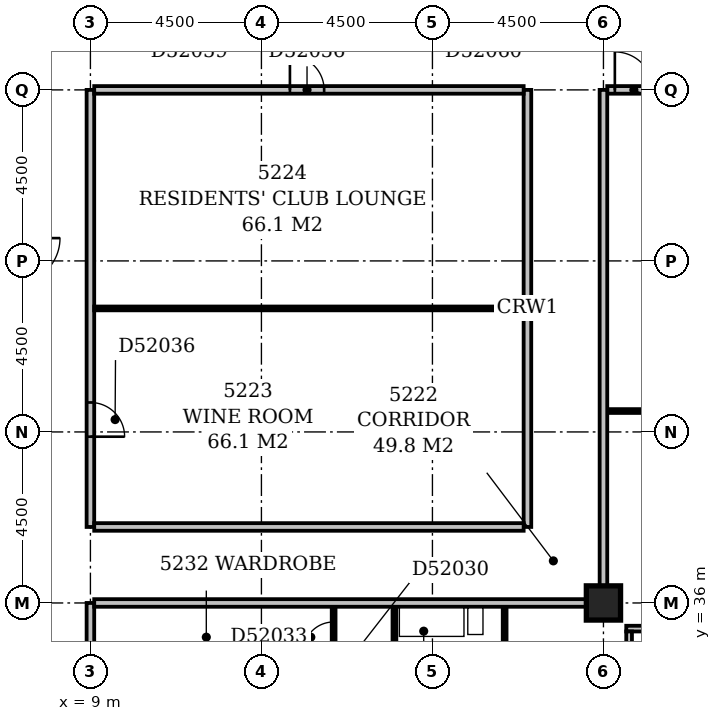
"""IFC4 building model, lengths in metres.
Left out: names, types, materials, properties, quantities, classifications, styles, units other than length and angle.
Written with IfcOpenShell. Run it as: python <this file> out.ifc"""

import sys

from ifc_helpers import new_model, si_unit, direction, frame, frame_2d, origin, origin_2d, place, context, subcontext, project, spatial, rectangle, extrude, element, fill, save


model = new_model("IFC4")
c1 = context("Model", 3, precision=1e-05, world=origin(), true_north=direction((0.0, 1.0)))
c2 = subcontext(c1, "Body", "Model", "MODEL_VIEW")
j1 = project(units=[si_unit("LENGTHUNIT", "METRE"), si_unit("PLANEANGLEUNIT", "RADIAN")], contexts=[c1])
p1 = place(None, origin())
s1 = spatial("IfcSite", under=j1, at=p1, CompositionType="ELEMENT")
p2 = place(p1, origin())
s2 = spatial("IfcBuilding", under=s1, at=p2, CompositionType="ELEMENT")
p3 = place(p2, frame((0.0, 0.0, 204.2)))
s3 = spatial("IfcBuildingStorey", under=s2, at=p3, CompositionType="ELEMENT", Elevation=204.2)
p4 = place(p3, frame((22.5, 36.0, -0.3), z_axis=(0.0, 0.0, 1.0), x_axis=(1.0, 0.0, 0.0)))
e1 = element("IfcColumn", 1, at=p4, inside=s3, PredefinedType="COLUMN", context=c2, shape_type="SweptSolid", body=[
    extrude(rectangle(XDim=0.9, YDim=0.9, at=origin_2d()), origin(), (0.0, 0.0, 1.0), 3.6),
])
p5 = place(p3, frame((23.175, 17.4, 0.0), z_axis=(0.0, 0.0, 1.0), x_axis=(0.0, 1.0, 0.0)))
e2 = element("IfcWall", 2, at=p5, inside=s3, PredefinedType="STANDARD", context=c2, shape_type="SweptSolid", body=[
    extrude(rectangle(XDim=17.85, YDim=0.15, at=frame_2d((8.925, 0.0))), origin(), (0.0, 0.0, 1.0), 2.7),
])
p6 = place(p5, frame((1.65, 0.0, 0.6)))
e3 = element("IfcOpeningElement", 3, at=p6, cuts=e2, PredefinedType="OPENING", context=c2, shape_type="SweptSolid", body=[
    extrude(rectangle(XDim=2.4, YDim=1.8, at=frame_2d((1.2, 0.9))), frame((0.0, 0.087, 0.0), z_axis=(0.0, -1.0, 0.0), x_axis=(1.0, 0.0, 0.0)), (0.0, 0.0, 1.0), 0.174),
])
p7 = place(p5, frame((6.15, 0.0, 0.6)))
e4 = element("IfcOpeningElement", 4, at=p7, cuts=e2, PredefinedType="OPENING", context=c2, shape_type="SweptSolid", body=[
    extrude(rectangle(XDim=2.4, YDim=1.8, at=frame_2d((1.2, 0.9))), frame((0.0, 0.087, 0.0), z_axis=(0.0, -1.0, 0.0), x_axis=(1.0, 0.0, 0.0)), (0.0, 0.0, 1.0), 0.174),
])
p8 = place(p5, frame((10.65, 0.0, 0.6)))
e5 = element("IfcOpeningElement", 5, at=p8, cuts=e2, PredefinedType="OPENING", context=c2, shape_type="SweptSolid", body=[
    extrude(rectangle(XDim=2.4, YDim=1.8, at=frame_2d((1.2, 0.9))), frame((0.0, 0.087, 0.0), z_axis=(0.0, -1.0, 0.0), x_axis=(1.0, 0.0, 0.0)), (0.0, 0.0, 1.0), 0.174),
])
p9 = place(p5, frame((15.15, 0.0, 0.6)))
e6 = element("IfcOpeningElement", 6, at=p9, cuts=e2, PredefinedType="OPENING", context=c2, shape_type="SweptSolid", body=[
    extrude(rectangle(XDim=2.4, YDim=1.8, at=frame_2d((1.2, 0.9))), frame((0.0, 0.087, 0.0), z_axis=(0.0, -1.0, 0.0), x_axis=(1.0, 0.0, 0.0)), (0.0, 0.0, 1.0), 0.174),
])
p10 = place(p3, frame((23.1, 35.325, 0.0), z_axis=(0.0, 0.0, 1.0), x_axis=(1.0, 0.0, 0.0)))
e7 = element("IfcWall", 7, at=p10, inside=s3, PredefinedType="STANDARD", context=c2, shape_type="SweptSolid", body=[
    extrude(rectangle(XDim=27.15, YDim=0.15, at=frame_2d((13.575, 0.0))), origin(), (0.0, 0.0, 1.0), 2.7),
])
p11 = place(p10, frame((0.45, 0.0, 0.6)))
e8 = element("IfcOpeningElement", 8, at=p11, cuts=e7, PredefinedType="OPENING", context=c2, shape_type="SweptSolid", body=[
    extrude(rectangle(XDim=2.4, YDim=1.8, at=frame_2d((1.2, 0.9))), frame((0.0, 0.087, 0.0), z_axis=(0.0, -1.0, 0.0), x_axis=(1.0, 0.0, 0.0)), (0.0, 0.0, 1.0), 0.174),
])
p12 = place(p10, frame((4.95, 0.0, 0.6)))
e9 = element("IfcOpeningElement", 9, at=p12, cuts=e7, PredefinedType="OPENING", context=c2, shape_type="SweptSolid", body=[
    extrude(rectangle(XDim=2.4, YDim=1.8, at=frame_2d((1.2, 0.9))), frame((0.0, 0.087, 0.0), z_axis=(0.0, -1.0, 0.0), x_axis=(1.0, 0.0, 0.0)), (0.0, 0.0, 1.0), 0.174),
])
p13 = place(p10, frame((9.118, 0.0, 0.6)))
e10 = element("IfcOpeningElement", 10, at=p13, cuts=e7, PredefinedType="OPENING", context=c2, shape_type="SweptSolid", body=[
    extrude(rectangle(XDim=0.45, YDim=1.8, at=frame_2d((0.225, 0.9))), frame((0.0, 0.087, 0.0), z_axis=(0.0, -1.0, 0.0), x_axis=(1.0, 0.0, 0.0)), (0.0, 0.0, 1.0), 0.174),
])
p14 = place(p10, frame((11.218, 0.0, 0.6)))
e11 = element("IfcOpeningElement", 11, at=p14, cuts=e7, PredefinedType="OPENING", context=c2, shape_type="SweptSolid", body=[
    extrude(rectangle(XDim=0.9, YDim=1.8, at=frame_2d((0.45, 0.9))), frame((0.0, 0.087, 0.0), z_axis=(0.0, -1.0, 0.0), x_axis=(1.0, 0.0, 0.0)), (0.0, 0.0, 1.0), 0.174),
])
p15 = place(p10, frame((13.61, 0.0, 0.6)))
e12 = element("IfcOpeningElement", 12, at=p15, cuts=e7, PredefinedType="OPENING", context=c2, shape_type="SweptSolid", body=[
    extrude(rectangle(XDim=1.2, YDim=1.8, at=frame_2d((0.6, 0.9))), frame((0.0, 0.087, 0.0), z_axis=(0.0, -1.0, 0.0), x_axis=(1.0, 0.0, 0.0)), (0.0, 0.0, 1.0), 0.174),
])
p16 = place(p10, frame((18.45, 0.0, 0.6)))
e13 = element("IfcOpeningElement", 13, at=p16, cuts=e7, PredefinedType="OPENING", context=c2, shape_type="SweptSolid", body=[
    extrude(rectangle(XDim=2.4, YDim=1.8, at=frame_2d((1.2, 0.9))), frame((0.0, 0.087, 0.0), z_axis=(0.0, -1.0, 0.0), x_axis=(1.0, 0.0, 0.0)), (0.0, 0.0, 1.0), 0.174),
])
p17 = place(p10, frame((22.95, 0.0, 0.6)))
e14 = element("IfcOpeningElement", 14, at=p17, cuts=e7, PredefinedType="OPENING", context=c2, shape_type="SweptSolid", body=[
    extrude(rectangle(XDim=2.4, YDim=1.8, at=frame_2d((1.2, 0.9))), frame((0.0, 0.087, 0.0), z_axis=(0.0, -1.0, 0.0), x_axis=(1.0, 0.0, 0.0)), (0.0, 0.0, 1.0), 0.174),
])
p18 = place(p3, frame((9.0, 5.0, 0.0), z_axis=(0.0, 0.0, 1.0), x_axis=(0.0, 1.0, 0.0)))
e15 = element("IfcWall", 15, at=p18, inside=s3, PredefinedType="PARTITIONING", context=c2, shape_type="SweptSolid", body=[
    extrude(rectangle(XDim=31.0, YDim=0.2, at=frame_2d((15.5, 0.0))), origin(), (0.0, 0.0, 1.0), 3.3),
])
p19 = place(p18, frame((18.4, 0.0, 0.0)))
e16 = element("IfcOpeningElement", 16, at=p19, cuts=e15, PredefinedType="OPENING", context=c2, shape_type="SweptSolid", body=[
    extrude(rectangle(XDim=1.0, YDim=2.1, at=frame_2d((0.5, 1.05))), frame((0.0, 0.112, 0.0), z_axis=(0.0, -1.0, 0.0), x_axis=(1.0, 0.0, 0.0)), (0.0, 0.0, 1.0), 0.224),
])
p20 = place(p18, frame((11.7, 0.0, 0.0)))
e17 = element("IfcOpeningElement", 17, at=p20, cuts=e15, PredefinedType="OPENING", context=c2, shape_type="SweptSolid", body=[
    extrude(rectangle(XDim=1.0, YDim=2.1, at=frame_2d((0.5, 1.05))), frame((0.0, 0.112, 0.0), z_axis=(0.0, -1.0, 0.0), x_axis=(1.0, 0.0, 0.0)), (0.0, 0.0, 1.0), 0.224),
])
p21 = place(p18, frame((1.5, 0.0, 0.0)))
e18 = element("IfcOpeningElement", 18, at=p21, cuts=e15, PredefinedType="OPENING", context=c2, shape_type="SweptSolid", body=[
    extrude(rectangle(XDim=0.9, YDim=2.1, at=frame_2d((0.45, 1.05))), frame((0.0, 0.112, 0.0), z_axis=(0.0, -1.0, 0.0), x_axis=(1.0, 0.0, 0.0)), (0.0, 0.0, 1.0), 0.224),
])
p22 = place(p3, frame((17.0, 18.1, 0.0), z_axis=(0.0, 0.0, 1.0), x_axis=(0.0, 1.0, 0.0)))
e19 = element("IfcWall", 19, at=p22, inside=s3, PredefinedType="PARTITIONING", context=c2, shape_type="SweptSolid", body=[
    extrude(rectangle(XDim=17.8, YDim=0.1, at=frame_2d((8.9, 0.0))), origin(), (0.0, 0.0, 1.0), 3.3),
])
p23 = place(p22, frame((2.85, 0.0, 0.0)))
e20 = element("IfcOpeningElement", 20, at=p23, cuts=e19, PredefinedType="OPENING", context=c2, shape_type="SweptSolid", body=[
    extrude(rectangle(XDim=0.9, YDim=2.1, at=frame_2d((0.45, 1.05))), frame((0.0, 0.062, 0.0), z_axis=(0.0, -1.0, 0.0), x_axis=(1.0, 0.0, 0.0)), (0.0, 0.0, 1.0), 0.124),
])
p24 = place(p22, frame((8.4, 0.0, 0.0)))
e21 = element("IfcOpeningElement", 21, at=p24, cuts=e19, PredefinedType="OPENING", context=c2, shape_type="SweptSolid", body=[
    extrude(rectangle(XDim=0.9, YDim=2.1, at=frame_2d((0.45, 1.05))), frame((0.0, 0.062, 0.0), z_axis=(0.0, -1.0, 0.0), x_axis=(1.0, 0.0, 0.0)), (0.0, 0.0, 1.0), 0.124),
])
p25 = place(p22, frame((14.05, 0.0, 0.0)))
e22 = element("IfcOpeningElement", 22, at=p25, cuts=e19, PredefinedType="OPENING", context=c2, shape_type="SweptSolid", body=[
    extrude(rectangle(XDim=0.9, YDim=2.1, at=frame_2d((0.45, 1.05))), frame((0.0, 0.062, 0.0), z_axis=(0.0, -1.0, 0.0), x_axis=(1.0, 0.0, 0.0)), (0.0, 0.0, 1.0), 0.124),
])
p26 = place(p3, frame((15.4, 24.7, 0.0), z_axis=(0.0, 0.0, 1.0), x_axis=(0.0, 1.0, 0.0)))
e23 = element("IfcWall", 23, at=p26, inside=s3, PredefinedType="PARTITIONING", context=c2, shape_type="SweptSolid", body=[
    extrude(rectangle(XDim=11.2, YDim=0.1, at=frame_2d((5.6, 0.0))), origin(), (0.0, 0.0, 1.0), 3.3),
])
p27 = place(p26, frame((0.8, 0.0, 0.0)))
e24 = element("IfcOpeningElement", 24, at=p27, cuts=e23, PredefinedType="OPENING", context=c2, shape_type="SweptSolid", body=[
    extrude(rectangle(XDim=0.8, YDim=2.1, at=frame_2d((0.4, 1.05))), frame((0.0, 0.062, 0.0), z_axis=(0.0, -1.0, 0.0), x_axis=(1.0, 0.0, 0.0)), (0.0, 0.0, 1.0), 0.124),
])
p28 = place(p26, frame((8.1, 0.0, 0.0)))
e25 = element("IfcOpeningElement", 25, at=p28, cuts=e23, PredefinedType="OPENING", context=c2, shape_type="SweptSolid", body=[
    extrude(rectangle(XDim=0.8, YDim=2.1, at=frame_2d((0.4, 1.05))), frame((0.0, 0.062, 0.0), z_axis=(0.0, -1.0, 0.0), x_axis=(1.0, 0.0, 0.0)), (0.0, 0.0, 1.0), 0.124),
])
p29 = place(p26, frame((4.3, 0.0, 0.0)))
e26 = element("IfcOpeningElement", 26, at=p29, cuts=e23, PredefinedType="OPENING", context=c2, shape_type="SweptSolid", body=[
    extrude(rectangle(XDim=0.8, YDim=2.1, at=frame_2d((0.4, 1.05))), frame((0.0, 0.062, 0.0), z_axis=(0.0, -1.0, 0.0), x_axis=(1.0, 0.0, 0.0)), (0.0, 0.0, 1.0), 0.124),
])
p30 = place(p26, frame((6.1, 0.0, 0.0)))
e27 = element("IfcOpeningElement", 27, at=p30, cuts=e23, PredefinedType="OPENING", context=c2, shape_type="SweptSolid", body=[
    extrude(rectangle(XDim=0.8, YDim=2.1, at=frame_2d((0.4, 1.05))), frame((0.0, 0.062, 0.0), z_axis=(0.0, -1.0, 0.0), x_axis=(1.0, 0.0, 0.0)), (0.0, 0.0, 1.0), 0.124),
])
p31 = place(p26, frame((10.0, 0.0, 0.0)))
e28 = element("IfcOpeningElement", 28, at=p31, cuts=e23, PredefinedType="OPENING", context=c2, shape_type="SweptSolid", body=[
    extrude(rectangle(XDim=0.8, YDim=2.1, at=frame_2d((0.4, 1.05))), frame((0.0, 0.062, 0.0), z_axis=(0.0, -1.0, 0.0), x_axis=(1.0, 0.0, 0.0)), (0.0, 0.0, 1.0), 0.124),
])
p32 = place(p26, frame((2.75, 0.0, 0.0)))
e29 = element("IfcOpeningElement", 29, at=p32, cuts=e23, PredefinedType="OPENING", context=c2, shape_type="SweptSolid", body=[
    extrude(rectangle(XDim=0.8, YDim=2.1, at=frame_2d((0.4, 1.05))), frame((0.0, 0.062, 0.0), z_axis=(0.0, -1.0, 0.0), x_axis=(1.0, 0.0, 0.0)), (0.0, 0.0, 1.0), 0.124),
])
p33 = place(p3, frame((19.9, 33.7, 0.0), z_axis=(0.0, 0.0, 1.0), x_axis=(0.0, 1.0, 0.0)))
e30 = element("IfcWall", 30, at=p33, inside=s3, PredefinedType="PLUMBINGWALL", context=c2, shape_type="SweptSolid", body=[
    extrude(rectangle(XDim=2.2, YDim=0.1, at=frame_2d((1.1, 0.0))), origin(), (0.0, 0.0, 1.0), 3.3),
])
p34 = place(p3, frame((9.1, 36.0, 0.0), z_axis=(0.0, 0.0, 1.0), x_axis=(1.0, 0.0, 0.0)))
e31 = element("IfcWall", 31, at=p34, inside=s3, PredefinedType="PARTITIONING", context=c2, shape_type="SweptSolid", body=[
    extrude(rectangle(XDim=12.95, YDim=0.2, at=frame_2d((6.475, 0.0))), origin(), (0.0, 0.0, 1.0), 3.3),
])
p35 = place(p3, frame((22.5, 36.45, 0.0), z_axis=(0.0, 0.0, 1.0), x_axis=(0.0, 1.0, 0.0)))
e32 = element("IfcWall", 32, at=p35, inside=s3, PredefinedType="PARTITIONING", context=c2, shape_type="SweptSolid", body=[
    extrude(rectangle(XDim=13.05, YDim=0.2, at=frame_2d((6.525, 0.0))), origin(), (0.0, 0.0, 1.0), 3.3),
])
p36 = place(p3, frame((9.0, 38.0, 0.0), z_axis=(0.0, 0.0, 1.0), x_axis=(0.0, 1.0, 0.0)))
e33 = element("IfcWall", 33, at=p36, inside=s3, PredefinedType="PARTITIONING", context=c2, shape_type="SweptSolid", body=[
    extrude(rectangle(XDim=11.5, YDim=0.2, at=frame_2d((5.75, 0.0))), origin(), (0.0, 0.0, 1.0), 3.3),
])
p37 = place(p36, frame((2.375, 0.0, 0.0)))
e34 = element("IfcOpeningElement", 34, at=p37, cuts=e33, PredefinedType="OPENING", context=c2, shape_type="SweptSolid", body=[
    extrude(rectangle(XDim=0.9, YDim=2.1, at=frame_2d((0.45, 1.05))), frame((0.0, 0.112, 0.0), z_axis=(0.0, -1.0, 0.0), x_axis=(1.0, 0.0, 0.0)), (0.0, 0.0, 1.0), 0.224),
])
p38 = place(p3, frame((9.1, 38.0, 0.0), z_axis=(0.0, 0.0, 1.0), x_axis=(1.0, 0.0, 0.0)))
e35 = element("IfcWall", 35, at=p38, inside=s3, PredefinedType="PARTITIONING", context=c2, shape_type="SweptSolid", body=[
    extrude(rectangle(XDim=11.3, YDim=0.2, at=frame_2d((5.65, 0.0))), origin(), (0.0, 0.0, 1.0), 3.3),
])
p39 = place(p3, frame((20.5, 38.0, 0.0), z_axis=(0.0, 0.0, 1.0), x_axis=(0.0, 1.0, 0.0)))
e36 = element("IfcWall", 36, at=p39, inside=s3, PredefinedType="PARTITIONING", context=c2, shape_type="SweptSolid", body=[
    extrude(rectangle(XDim=11.5, YDim=0.2, at=frame_2d((5.75, 0.0))), origin(), (0.0, 0.0, 1.0), 3.3),
])
p40 = place(p3, frame((22.6, 41.05, 0.0), z_axis=(0.0, 0.0, 1.0), x_axis=(1.0, 0.0, 0.0)))
e37 = element("IfcWall", 37, at=p40, inside=s3, PredefinedType="PARTITIONING", context=c2, shape_type="SweptSolid", body=[
    extrude(rectangle(XDim=22.3, YDim=0.1, at=frame_2d((11.15, 0.0))), origin(), (0.0, 0.0, 1.0), 3.3),
])
p41 = place(p40, frame((3.9, 0.0, 0.0)))
e38 = element("IfcOpeningElement", 38, at=p41, cuts=e37, PredefinedType="OPENING", context=c2, shape_type="SweptSolid", body=[
    extrude(rectangle(XDim=0.9, YDim=2.1, at=frame_2d((0.45, 1.05))), frame((0.0, 0.062, 0.0), z_axis=(0.0, -1.0, 0.0), x_axis=(1.0, 0.0, 0.0)), (0.0, 0.0, 1.0), 0.124),
])
p42 = place(p40, frame((9.55, 0.0, 0.0)))
e39 = element("IfcOpeningElement", 39, at=p42, cuts=e37, PredefinedType="OPENING", context=c2, shape_type="SweptSolid", body=[
    extrude(rectangle(XDim=0.9, YDim=2.1, at=frame_2d((0.45, 1.05))), frame((0.0, 0.062, 0.0), z_axis=(0.0, -1.0, 0.0), x_axis=(1.0, 0.0, 0.0)), (0.0, 0.0, 1.0), 0.124),
])
p43 = place(p40, frame((16.35, 0.0, 0.0)))
e40 = element("IfcOpeningElement", 40, at=p43, cuts=e37, PredefinedType="OPENING", context=c2, shape_type="SweptSolid", body=[
    extrude(rectangle(XDim=0.9, YDim=2.1, at=frame_2d((0.45, 1.05))), frame((0.0, 0.062, 0.0), z_axis=(0.0, -1.0, 0.0), x_axis=(1.0, 0.0, 0.0)), (0.0, 0.0, 1.0), 0.124),
])
p44 = place(p40, frame((19.7, 0.0, 0.0)))
e41 = element("IfcOpeningElement", 41, at=p44, cuts=e37, PredefinedType="OPENING", context=c2, shape_type="SweptSolid", body=[
    extrude(rectangle(XDim=0.9, YDim=2.1, at=frame_2d((0.45, 1.05))), frame((0.0, 0.062, 0.0), z_axis=(0.0, -1.0, 0.0), x_axis=(1.0, 0.0, 0.0)), (0.0, 0.0, 1.0), 0.124),
])
p45 = place(p3, frame((9.1, 43.75, 0.0), z_axis=(0.0, 0.0, 1.0), x_axis=(1.0, 0.0, 0.0)))
e42 = element("IfcWall", 42, at=p45, inside=s3, PredefinedType="PARTITIONING", context=c2, shape_type="SweptSolid", body=[
    extrude(rectangle(XDim=11.3, YDim=0.1, at=frame_2d((5.65, 0.0))), origin(), (0.0, 0.0, 1.0), 3.3),
])
p46 = place(p3, frame((9.1, 49.5, 0.0), z_axis=(0.0, 0.0, 1.0), x_axis=(1.0, 0.0, 0.0)))
e43 = element("IfcWall", 43, at=p46, inside=s3, PredefinedType="PARTITIONING", context=c2, shape_type="SweptSolid", body=[
    extrude(rectangle(XDim=11.3, YDim=0.2, at=frame_2d((5.65, 0.0))), origin(), (0.0, 0.0, 1.0), 3.3),
])
p47 = place(p46, frame((5.15, 0.0, 0.0)))
e44 = element("IfcOpeningElement", 44, at=p47, cuts=e43, PredefinedType="OPENING", context=c2, shape_type="SweptSolid", body=[
    extrude(rectangle(XDim=0.9, YDim=2.1, at=frame_2d((0.45, 1.05))), frame((0.0, 0.112, 0.0), z_axis=(0.0, -1.0, 0.0), x_axis=(1.0, 0.0, 0.0)), (0.0, 0.0, 1.0), 0.224),
])
p48 = place(p3, frame((22.6, 49.5, 0.0), z_axis=(0.0, 0.0, 1.0), x_axis=(1.0, 0.0, 0.0)))
e45 = element("IfcWall", 45, at=p48, inside=s3, PredefinedType="PARTITIONING", context=c2, shape_type="SweptSolid", body=[
    extrude(rectangle(XDim=30.95, YDim=0.2, at=frame_2d((15.475, 0.0))), origin(), (0.0, 0.0, 1.0), 3.3),
])
p49 = place(p48, frame((0.2, 0.0, 0.0)))
e46 = element("IfcOpeningElement", 46, at=p49, cuts=e45, PredefinedType="OPENING", context=c2, shape_type="SweptSolid", body=[
    extrude(rectangle(XDim=1.0, YDim=2.1, at=frame_2d((0.5, 1.05))), frame((0.0, 0.112, 0.0), z_axis=(0.0, -1.0, 0.0), x_axis=(1.0, 0.0, 0.0)), (0.0, 0.0, 1.0), 0.224),
])
p50 = place(p48, frame((22.7, 0.0, 0.0)))
e47 = element("IfcOpeningElement", 47, at=p50, cuts=e45, PredefinedType="OPENING", context=c2, shape_type="SweptSolid", body=[
    extrude(rectangle(XDim=1.0, YDim=2.1, at=frame_2d((0.5, 1.05))), frame((0.0, 0.112, 0.0), z_axis=(0.0, -1.0, 0.0), x_axis=(1.0, 0.0, 0.0)), (0.0, 0.0, 1.0), 0.224),
])
p51 = place(p31, origin())
e48 = element("IfcDoor", 48, at=p51, inside=s3, OperationType="SINGLE_SWING_LEFT", PredefinedType="DOOR", context=c2, shape_type="SweptSolid", body=[
    extrude(rectangle(XDim=0.8, YDim=2.1, at=frame_2d((0.4, 1.05))), frame((0.0, 0.025, 0.0), z_axis=(0.0, -1.0, 0.0), x_axis=(1.0, 0.0, 0.0)), (0.0, 0.0, 1.0), 0.05),
])
fill(e28, e48)
p52 = place(p37, frame((0.9, 0.0, 0.0), z_axis=(0.0, 0.0, 1.0), x_axis=(-1.0, 0.0, 0.0)))
e49 = element("IfcDoor", 49, at=p52, inside=s3, OperationType="SINGLE_SWING_RIGHT", PredefinedType="DOOR", context=c2, shape_type="SweptSolid", body=[
    extrude(rectangle(XDim=0.9, YDim=2.1, at=frame_2d((0.45, 1.05))), frame((0.0, 0.025, 0.0), z_axis=(0.0, -1.0, 0.0), x_axis=(1.0, 0.0, 0.0)), (0.0, 0.0, 1.0), 0.05),
])
fill(e34, e49)
p53 = place(p47, origin())
e50 = element("IfcDoor", 50, at=p53, inside=s3, OperationType="SINGLE_SWING_LEFT", PredefinedType="DOOR", context=c2, shape_type="SweptSolid", body=[
    extrude(rectangle(XDim=0.9, YDim=2.1, at=frame_2d((0.45, 1.05))), frame((0.0, 0.025, 0.0), z_axis=(0.0, -1.0, 0.0), x_axis=(1.0, 0.0, 0.0)), (0.0, 0.0, 1.0), 0.05),
])
fill(e44, e50)
p54 = place(p49, origin())
e51 = element("IfcDoor", 51, at=p54, inside=s3, OperationType="SINGLE_SWING_LEFT", PredefinedType="DOOR", context=c2, shape_type="SweptSolid", body=[
    extrude(rectangle(XDim=1.0, YDim=2.1, at=frame_2d((0.5, 1.05))), frame((0.0, 0.025, 0.0), z_axis=(0.0, -1.0, 0.0), x_axis=(1.0, 0.0, 0.0)), (0.0, 0.0, 1.0), 0.05),
])
fill(e46, e51)
save(model, sys.argv[1])
